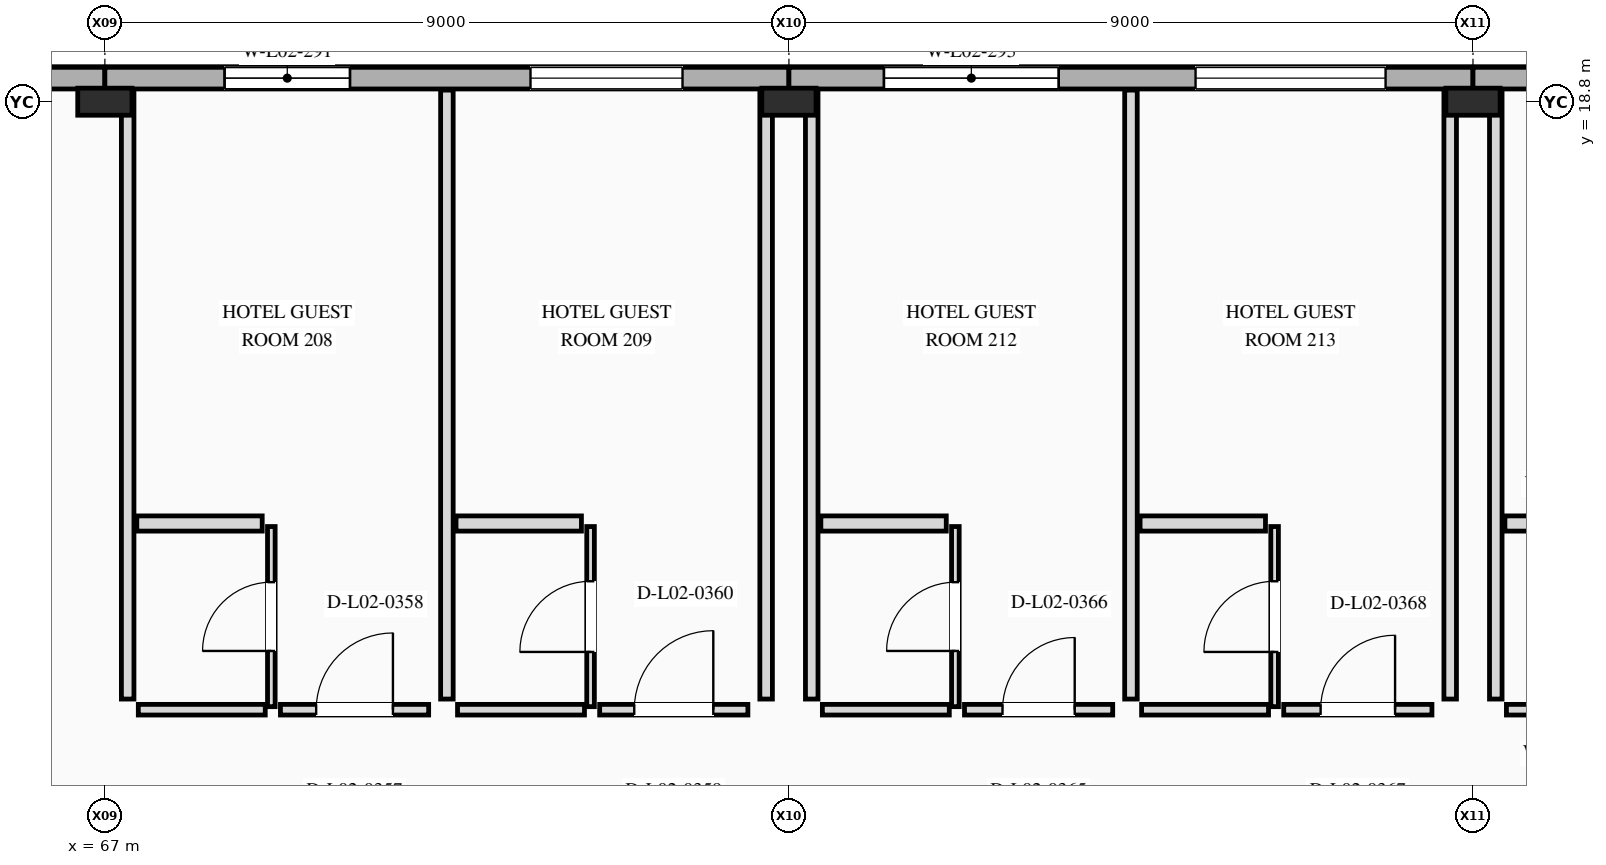
"""IFC4 building model, lengths in metres.
Left out: names, types, materials, properties, quantities, classifications, styles, units other than length and angle.
Written with IfcOpenShell. Run it as: python <this file> out.ifc"""

import sys

from ifc_helpers import new_model, si_unit, direction, frame, frame_2d, origin, origin_2d, place, context, subcontext, project, spatial, rectangle, i_section, extrude, element, fill, save


model = new_model("IFC4")
c1 = context("Model", 3, precision=1e-05, world=origin(), true_north=direction((0.0, 1.0)))
c2 = subcontext(c1, "Body", "Model", "MODEL_VIEW")
j1 = project(units=[si_unit("LENGTHUNIT", "METRE"), si_unit("PLANEANGLEUNIT", "RADIAN")], contexts=[c1])
p1 = place(None, origin())
s1 = spatial("IfcSite", under=j1, at=p1, CompositionType="ELEMENT")
p2 = place(p1, origin())
s2 = spatial("IfcBuilding", under=s1, at=p2, CompositionType="ELEMENT")
p3 = place(p2, frame((0.0, 0.0, 10.8)))
s3 = spatial("IfcBuildingStorey", under=s2, at=p3, CompositionType="ELEMENT", Elevation=10.8)
for number, where, z_axis, x_axis in (
    (1, (67.0, 18.8, 0.0), (0.0, 0.0, 1.0), (0.0, 1.0, 0.0)),
    (2, (76.0, 18.8, 0.0), (0.0, 0.0, 1.0), (0.0, 1.0, 0.0)),
    (3, (85.0, 18.8, 0.0), (0.0, 0.0, 1.0), (0.0, 1.0, 0.0)),
):
    element("IfcColumn", number, at=place(p3, frame(where, z_axis=z_axis, x_axis=x_axis)), inside=s3, PredefinedType="COLUMN", context=c2, shape_type="SweptSolid", body=[
        extrude(i_section(OverallWidth=0.356, OverallDepth=0.714, WebThickness=0.019, FlangeThickness=0.034, at=origin_2d()), origin(), (0.0, 0.0, 1.0), 4.8),
    ])
p4 = place(p3, frame((67.0, 19.11, 0.0), z_axis=(0.0, 0.0, 1.0), x_axis=(-1.0, 0.0, 0.0)))
e4 = element("IfcWall", 4, at=p4, inside=s3, PredefinedType="STANDARD", context=c2, shape_type="SweptSolid", body=[
    extrude(rectangle(XDim=8.545, YDim=0.285, at=frame_2d((4.273, 0.0))), origin(), (0.0, 0.0, 1.0), 4.8),
])
p5 = place(p3, frame((76.0, 19.11, 0.0), z_axis=(0.0, 0.0, 1.0), x_axis=(-1.0, 0.0, 0.0)))
e5 = element("IfcWall", 5, at=p5, inside=s3, PredefinedType="STANDARD", context=c2, shape_type="SweptSolid", body=[
    extrude(rectangle(XDim=9.0, YDim=0.285, at=frame_2d((4.5, 0.0))), origin(), (0.0, 0.0, 1.0), 4.8),
])
p6 = place(p5, frame((5.775, 0.0, 0.85)))
e6 = element("IfcOpeningElement", 6, at=p6, cuts=e5, PredefinedType="OPENING", context=c2, shape_type="SweptSolid", body=[
    extrude(rectangle(XDim=1.65, YDim=1.75, at=frame_2d((0.825, 0.875))), frame((0.0, 0.152, 0.0), z_axis=(0.0, -1.0, 0.0), x_axis=(1.0, 0.0, 0.0)), (0.0, 0.0, 1.0), 0.305),
])
p7 = place(p5, frame((1.4, 0.0, 0.85)))
e7 = element("IfcOpeningElement", 7, at=p7, cuts=e5, PredefinedType="OPENING", context=c2, shape_type="SweptSolid", body=[
    extrude(rectangle(XDim=2.0, YDim=1.65, at=frame_2d((1.0, 0.825))), frame((0.0, 0.152, 0.0), z_axis=(0.0, -1.0, 0.0), x_axis=(1.0, 0.0, 0.0)), (0.0, 0.0, 1.0), 0.305),
])
p8 = place(p3, frame((85.0, 19.11, 0.0), z_axis=(0.0, 0.0, 1.0), x_axis=(-1.0, 0.0, 0.0)))
e8 = element("IfcWall", 8, at=p8, inside=s3, PredefinedType="STANDARD", context=c2, shape_type="SweptSolid", body=[
    extrude(rectangle(XDim=9.0, YDim=0.285, at=frame_2d((4.5, 0.0))), origin(), (0.0, 0.0, 1.0), 4.8),
])
p9 = place(p8, frame((5.45, 0.0, 0.85)))
e9 = element("IfcOpeningElement", 9, at=p9, cuts=e8, PredefinedType="OPENING", context=c2, shape_type="SweptSolid", body=[
    extrude(rectangle(XDim=2.3, YDim=1.7, at=frame_2d((1.15, 0.85))), frame((0.0, 0.152, 0.0), z_axis=(0.0, -1.0, 0.0), x_axis=(1.0, 0.0, 0.0)), (0.0, 0.0, 1.0), 0.305),
])
p10 = place(p8, frame((1.15, 0.0, 0.85)))
e10 = element("IfcOpeningElement", 10, at=p10, cuts=e8, PredefinedType="OPENING", context=c2, shape_type="SweptSolid", body=[
    extrude(rectangle(XDim=2.5, YDim=1.75, at=frame_2d((1.25, 0.875))), frame((0.0, 0.152, 0.0), z_axis=(0.0, -1.0, 0.0), x_axis=(1.0, 0.0, 0.0)), (0.0, 0.0, 1.0), 0.305),
])
p11 = place(p3, frame((94.0, 19.11, 0.0), z_axis=(0.0, 0.0, 1.0), x_axis=(-1.0, 0.0, 0.0)))
e11 = element("IfcWall", 11, at=p11, inside=s3, PredefinedType="STANDARD", context=c2, shape_type="SweptSolid", body=[
    extrude(rectangle(XDim=9.0, YDim=0.285, at=frame_2d((4.5, 0.0))), origin(), (0.0, 0.0, 1.0), 4.8),
])
p12 = place(p3, frame((67.44, 10.8, 0.0), z_axis=(0.0, 0.0, 1.0), x_axis=(1.0, 0.0, 0.0)))
e12 = element("IfcWall", 12, at=p12, inside=s3, PredefinedType="PARTITIONING", context=c2, shape_type="SweptSolid", body=[
    extrude(rectangle(XDim=1.67, YDim=0.14, at=frame_2d((0.835, 0.0))), origin(), (0.0, 0.0, 1.0), 4.475),
])
p13 = place(p3, frame((69.31, 10.8, 0.0), z_axis=(0.0, 0.0, 1.0), x_axis=(1.0, 0.0, 0.0)))
e13 = element("IfcWall", 13, at=p13, inside=s3, PredefinedType="PARTITIONING", context=c2, shape_type="SweptSolid", body=[
    extrude(rectangle(XDim=1.95, YDim=0.14, at=frame_2d((0.975, 0.0))), origin(), (0.0, 0.0, 1.0), 4.475),
])
p14 = place(p13, frame((0.47, 0.0, 0.0)))
e14 = element("IfcOpeningElement", 14, at=p14, cuts=e13, PredefinedType="OPENING", context=c2, shape_type="SweptSolid", body=[
    extrude(rectangle(XDim=1.01, YDim=2.35, at=frame_2d((0.505, 1.175))), frame((0.0, 0.08, 0.0), z_axis=(0.0, -1.0, 0.0), x_axis=(1.0, 0.0, 0.0)), (0.0, 0.0, 1.0), 0.16),
])
p15 = place(p3, frame((67.3, 10.94, 0.0), z_axis=(0.0, 0.0, 1.0), x_axis=(0.0, 1.0, 0.0)))
e15 = element("IfcWall", 15, at=p15, inside=s3, PredefinedType="PARTITIONING", context=c2, shape_type="SweptSolid", body=[
    extrude(rectangle(XDim=8.012, YDim=0.165, at=frame_2d((4.006, 0.0))), origin(), (0.0, 0.0, 1.0), 3.804),
])
p16 = place(p3, frame((71.5, 10.94, 0.0), z_axis=(0.0, 0.0, 1.0), x_axis=(0.0, 1.0, 0.0)))
e16 = element("IfcWall", 16, at=p16, inside=s3, PredefinedType="PARTITIONING", context=c2, shape_type="SweptSolid", body=[
    extrude(rectangle(XDim=8.012, YDim=0.165, at=frame_2d((4.006, 0.0))), origin(), (0.0, 0.0, 1.0), 3.888),
])
p17 = place(p3, frame((69.19, 10.84, 0.0), z_axis=(0.0, 0.0, 1.0), x_axis=(0.0, 1.0, 0.0)))
e17 = element("IfcWall", 17, at=p17, inside=s3, PredefinedType="PARTITIONING", context=c2, shape_type="SweptSolid", body=[
    extrude(rectangle(XDim=2.37, YDim=0.1, at=frame_2d((1.185, 0.0))), origin(), (0.0, 0.0, 1.0), 4.083),
])
p18 = place(p17, frame((0.733, 0.0, 0.0)))
e18 = element("IfcOpeningElement", 18, at=p18, cuts=e17, PredefinedType="OPENING", context=c2, shape_type="SweptSolid", body=[
    extrude(rectangle(XDim=0.905, YDim=2.1, at=frame_2d((0.453, 1.05))), frame((0.0, 0.06, 0.0), z_axis=(0.0, -1.0, 0.0), x_axis=(1.0, 0.0, 0.0)), (0.0, 0.0, 1.0), 0.12),
])
p19 = place(p3, frame((67.42, 13.25, 0.0), z_axis=(0.0, 0.0, 1.0), x_axis=(1.0, 0.0, 0.0)))
e19 = element("IfcWall", 19, at=p19, inside=s3, PredefinedType="PLUMBINGWALL", context=c2, shape_type="SweptSolid", body=[
    extrude(rectangle(XDim=1.65, YDim=0.2, at=frame_2d((0.825, 0.0))), origin(), (0.0, 0.0, 1.0), 4.475),
])
p20 = place(p3, frame((71.64, 10.8, 0.0), z_axis=(0.0, 0.0, 1.0), x_axis=(1.0, 0.0, 0.0)))
e20 = element("IfcWall", 20, at=p20, inside=s3, PredefinedType="PARTITIONING", context=c2, shape_type="SweptSolid", body=[
    extrude(rectangle(XDim=1.67, YDim=0.14, at=frame_2d((0.835, 0.0))), origin(), (0.0, 0.0, 1.0), 4.475),
])
p21 = place(p3, frame((73.51, 10.8, 0.0), z_axis=(0.0, 0.0, 1.0), x_axis=(1.0, 0.0, 0.0)))
e21 = element("IfcWall", 21, at=p21, inside=s3, PredefinedType="PARTITIONING", context=c2, shape_type="SweptSolid", body=[
    extrude(rectangle(XDim=1.95, YDim=0.14, at=frame_2d((0.975, 0.0))), origin(), (0.0, 0.0, 1.0), 4.475),
])
p22 = place(p21, frame((0.455, 0.0, 0.0)))
e22 = element("IfcOpeningElement", 22, at=p22, cuts=e21, PredefinedType="OPENING", context=c2, shape_type="SweptSolid", body=[
    extrude(rectangle(XDim=1.04, YDim=2.4, at=frame_2d((0.52, 1.2))), frame((0.0, 0.08, 0.0), z_axis=(0.0, -1.0, 0.0), x_axis=(1.0, 0.0, 0.0)), (0.0, 0.0, 1.0), 0.16),
])
p23 = place(p3, frame((75.7, 10.94, 0.0), z_axis=(0.0, 0.0, 1.0), x_axis=(0.0, 1.0, 0.0)))
e23 = element("IfcWall", 23, at=p23, inside=s3, PredefinedType="PARTITIONING", context=c2, shape_type="SweptSolid", body=[
    extrude(rectangle(XDim=8.012, YDim=0.165, at=frame_2d((4.006, 0.0))), origin(), (0.0, 0.0, 1.0), 3.804),
])
p24 = place(p3, frame((73.39, 10.84, 0.0), z_axis=(0.0, 0.0, 1.0), x_axis=(0.0, 1.0, 0.0)))
e24 = element("IfcWall", 24, at=p24, inside=s3, PredefinedType="PARTITIONING", context=c2, shape_type="SweptSolid", body=[
    extrude(rectangle(XDim=2.37, YDim=0.1, at=frame_2d((1.185, 0.0))), origin(), (0.0, 0.0, 1.0), 4.083),
])
p25 = place(p24, frame((0.72, 0.0, 0.0)))
e25 = element("IfcOpeningElement", 25, at=p25, cuts=e24, PredefinedType="OPENING", context=c2, shape_type="SweptSolid", body=[
    extrude(rectangle(XDim=0.93, YDim=2.14, at=frame_2d((0.465, 1.07))), frame((0.0, 0.06, 0.0), z_axis=(0.0, -1.0, 0.0), x_axis=(1.0, 0.0, 0.0)), (0.0, 0.0, 1.0), 0.12),
])
p26 = place(p3, frame((71.62, 13.25, 0.0), z_axis=(0.0, 0.0, 1.0), x_axis=(1.0, 0.0, 0.0)))
e26 = element("IfcWall", 26, at=p26, inside=s3, PredefinedType="PLUMBINGWALL", context=c2, shape_type="SweptSolid", body=[
    extrude(rectangle(XDim=1.65, YDim=0.2, at=frame_2d((0.825, 0.0))), origin(), (0.0, 0.0, 1.0), 4.475),
])
p27 = place(p3, frame((76.44, 10.8, 0.0), z_axis=(0.0, 0.0, 1.0), x_axis=(1.0, 0.0, 0.0)))
e27 = element("IfcWall", 27, at=p27, inside=s3, PredefinedType="PARTITIONING", context=c2, shape_type="SweptSolid", body=[
    extrude(rectangle(XDim=1.67, YDim=0.14, at=frame_2d((0.835, 0.0))), origin(), (0.0, 0.0, 1.0), 4.475),
])
p28 = place(p3, frame((78.31, 10.8, 0.0), z_axis=(0.0, 0.0, 1.0), x_axis=(1.0, 0.0, 0.0)))
e28 = element("IfcWall", 28, at=p28, inside=s3, PredefinedType="PARTITIONING", context=c2, shape_type="SweptSolid", body=[
    extrude(rectangle(XDim=1.95, YDim=0.14, at=frame_2d((0.975, 0.0))), origin(), (0.0, 0.0, 1.0), 4.475),
])
p29 = place(p28, frame((0.5, 0.0, 0.0)))
e29 = element("IfcOpeningElement", 29, at=p29, cuts=e28, PredefinedType="OPENING", context=c2, shape_type="SweptSolid", body=[
    extrude(rectangle(XDim=0.95, YDim=2.15, at=frame_2d((0.475, 1.075))), frame((0.0, 0.08, 0.0), z_axis=(0.0, -1.0, 0.0), x_axis=(1.0, 0.0, 0.0)), (0.0, 0.0, 1.0), 0.16),
])
p30 = place(p3, frame((76.3, 10.94, 0.0), z_axis=(0.0, 0.0, 1.0), x_axis=(0.0, 1.0, 0.0)))
e30 = element("IfcWall", 30, at=p30, inside=s3, PredefinedType="PARTITIONING", context=c2, shape_type="SweptSolid", body=[
    extrude(rectangle(XDim=8.012, YDim=0.165, at=frame_2d((4.006, 0.0))), origin(), (0.0, 0.0, 1.0), 3.804),
])
p31 = place(p3, frame((80.5, 10.94, 0.0), z_axis=(0.0, 0.0, 1.0), x_axis=(0.0, 1.0, 0.0)))
e31 = element("IfcWall", 31, at=p31, inside=s3, PredefinedType="PARTITIONING", context=c2, shape_type="SweptSolid", body=[
    extrude(rectangle(XDim=8.012, YDim=0.165, at=frame_2d((4.006, 0.0))), origin(), (0.0, 0.0, 1.0), 3.888),
])
p32 = place(p3, frame((78.19, 10.84, 0.0), z_axis=(0.0, 0.0, 1.0), x_axis=(0.0, 1.0, 0.0)))
e32 = element("IfcWall", 32, at=p32, inside=s3, PredefinedType="PARTITIONING", context=c2, shape_type="SweptSolid", body=[
    extrude(rectangle(XDim=2.37, YDim=0.1, at=frame_2d((1.185, 0.0))), origin(), (0.0, 0.0, 1.0), 4.083),
])
p33 = place(p32, frame((0.733, 0.0, 0.0)))
e33 = element("IfcOpeningElement", 33, at=p33, cuts=e32, PredefinedType="OPENING", context=c2, shape_type="SweptSolid", body=[
    extrude(rectangle(XDim=0.905, YDim=2.18, at=frame_2d((0.453, 1.09))), frame((0.0, 0.06, 0.0), z_axis=(0.0, -1.0, 0.0), x_axis=(1.0, 0.0, 0.0)), (0.0, 0.0, 1.0), 0.12),
])
p34 = place(p3, frame((76.42, 13.25, 0.0), z_axis=(0.0, 0.0, 1.0), x_axis=(1.0, 0.0, 0.0)))
e34 = element("IfcWall", 34, at=p34, inside=s3, PredefinedType="PLUMBINGWALL", context=c2, shape_type="SweptSolid", body=[
    extrude(rectangle(XDim=1.65, YDim=0.2, at=frame_2d((0.825, 0.0))), origin(), (0.0, 0.0, 1.0), 4.475),
])
p35 = place(p3, frame((80.64, 10.8, 0.0), z_axis=(0.0, 0.0, 1.0), x_axis=(1.0, 0.0, 0.0)))
e35 = element("IfcWall", 35, at=p35, inside=s3, PredefinedType="PARTITIONING", context=c2, shape_type="SweptSolid", body=[
    extrude(rectangle(XDim=1.67, YDim=0.14, at=frame_2d((0.835, 0.0))), origin(), (0.0, 0.0, 1.0), 4.475),
])
p36 = place(p3, frame((82.51, 10.8, 0.0), z_axis=(0.0, 0.0, 1.0), x_axis=(1.0, 0.0, 0.0)))
e36 = element("IfcWall", 36, at=p36, inside=s3, PredefinedType="PARTITIONING", context=c2, shape_type="SweptSolid", body=[
    extrude(rectangle(XDim=1.95, YDim=0.14, at=frame_2d((0.975, 0.0))), origin(), (0.0, 0.0, 1.0), 4.475),
])
p37 = place(p36, frame((0.485, 0.0, 0.0)))
e37 = element("IfcOpeningElement", 37, at=p37, cuts=e36, PredefinedType="OPENING", context=c2, shape_type="SweptSolid", body=[
    extrude(rectangle(XDim=0.98, YDim=2.2, at=frame_2d((0.49, 1.1))), frame((0.0, 0.08, 0.0), z_axis=(0.0, -1.0, 0.0), x_axis=(1.0, 0.0, 0.0)), (0.0, 0.0, 1.0), 0.16),
])
p38 = place(p3, frame((84.7, 10.94, 0.0), z_axis=(0.0, 0.0, 1.0), x_axis=(0.0, 1.0, 0.0)))
e38 = element("IfcWall", 38, at=p38, inside=s3, PredefinedType="PARTITIONING", context=c2, shape_type="SweptSolid", body=[
    extrude(rectangle(XDim=8.012, YDim=0.165, at=frame_2d((4.006, 0.0))), origin(), (0.0, 0.0, 1.0), 3.804),
])
p39 = place(p3, frame((82.39, 10.84, 0.0), z_axis=(0.0, 0.0, 1.0), x_axis=(0.0, 1.0, 0.0)))
e39 = element("IfcWall", 39, at=p39, inside=s3, PredefinedType="PARTITIONING", context=c2, shape_type="SweptSolid", body=[
    extrude(rectangle(XDim=2.37, YDim=0.1, at=frame_2d((1.185, 0.0))), origin(), (0.0, 0.0, 1.0), 4.083),
])
p40 = place(p39, frame((0.72, 0.0, 0.0)))
e40 = element("IfcOpeningElement", 40, at=p40, cuts=e39, PredefinedType="OPENING", context=c2, shape_type="SweptSolid", body=[
    extrude(rectangle(XDim=0.93, YDim=2.22, at=frame_2d((0.465, 1.11))), frame((0.0, 0.06, 0.0), z_axis=(0.0, -1.0, 0.0), x_axis=(1.0, 0.0, 0.0)), (0.0, 0.0, 1.0), 0.12),
])
p41 = place(p3, frame((80.62, 13.25, 0.0), z_axis=(0.0, 0.0, 1.0), x_axis=(1.0, 0.0, 0.0)))
e41 = element("IfcWall", 41, at=p41, inside=s3, PredefinedType="PLUMBINGWALL", context=c2, shape_type="SweptSolid", body=[
    extrude(rectangle(XDim=1.65, YDim=0.2, at=frame_2d((0.825, 0.0))), origin(), (0.0, 0.0, 1.0), 4.475),
])
p42 = place(p3, frame((85.44, 10.8, 0.0), z_axis=(0.0, 0.0, 1.0), x_axis=(1.0, 0.0, 0.0)))
e42 = element("IfcWall", 42, at=p42, inside=s3, PredefinedType="PARTITIONING", context=c2, shape_type="SweptSolid", body=[
    extrude(rectangle(XDim=1.93, YDim=0.14, at=frame_2d((0.965, 0.0))), origin(), (0.0, 0.0, 1.0), 4.475),
])
p43 = place(p3, frame((85.3, 10.94, 0.0), z_axis=(0.0, 0.0, 1.0), x_axis=(0.0, 1.0, 0.0)))
e43 = element("IfcWall", 43, at=p43, inside=s3, PredefinedType="PARTITIONING", context=c2, shape_type="SweptSolid", body=[
    extrude(rectangle(XDim=8.012, YDim=0.165, at=frame_2d((4.006, 0.0))), origin(), (0.0, 0.0, 1.0), 3.804),
])
p44 = place(p3, frame((85.42, 13.25, 0.0), z_axis=(0.0, 0.0, 1.0), x_axis=(1.0, 0.0, 0.0)))
e44 = element("IfcWall", 44, at=p44, inside=s3, PredefinedType="PLUMBINGWALL", context=c2, shape_type="SweptSolid", body=[
    extrude(rectangle(XDim=1.91, YDim=0.2, at=frame_2d((0.955, 0.0))), origin(), (0.0, 0.0, 1.0), 4.475),
])
p45 = place(p6, origin())
e45 = element("IfcWindow", 45, at=p45, inside=s3, PartitioningType="SINGLE_PANEL", PredefinedType="WINDOW", context=c2, shape_type="SweptSolid", body=[
    extrude(rectangle(XDim=1.65, YDim=1.75, at=frame_2d((0.825, 0.875))), frame((0.0, 0.03, 0.0), z_axis=(0.0, -1.0, 0.0), x_axis=(1.0, 0.0, 0.0)), (0.0, 0.0, 1.0), 0.06),
])
fill(e6, e45)
p46 = place(p7, origin())
e46 = element("IfcWindow", 46, at=p46, inside=s3, PartitioningType="SINGLE_PANEL", PredefinedType="WINDOW", context=c2, shape_type="SweptSolid", body=[
    extrude(rectangle(XDim=2.0, YDim=1.65, at=frame_2d((1.0, 0.825))), frame((0.0, 0.03, 0.0), z_axis=(0.0, -1.0, 0.0), x_axis=(1.0, 0.0, 0.0)), (0.0, 0.0, 1.0), 0.06),
])
fill(e7, e46)
p47 = place(p9, origin())
e47 = element("IfcWindow", 47, at=p47, inside=s3, PartitioningType="SINGLE_PANEL", PredefinedType="WINDOW", context=c2, shape_type="SweptSolid", body=[
    extrude(rectangle(XDim=2.3, YDim=1.7, at=frame_2d((1.15, 0.85))), frame((0.0, 0.03, 0.0), z_axis=(0.0, -1.0, 0.0), x_axis=(1.0, 0.0, 0.0)), (0.0, 0.0, 1.0), 0.06),
])
fill(e9, e47)
p48 = place(p10, origin())
e48 = element("IfcWindow", 48, at=p48, inside=s3, PartitioningType="SINGLE_PANEL", PredefinedType="WINDOW", context=c2, shape_type="SweptSolid", body=[
    extrude(rectangle(XDim=2.5, YDim=1.75, at=frame_2d((1.25, 0.875))), frame((0.0, 0.03, 0.0), z_axis=(0.0, -1.0, 0.0), x_axis=(1.0, 0.0, 0.0)), (0.0, 0.0, 1.0), 0.06),
])
fill(e10, e48)
p49 = place(p14, origin())
e49 = element("IfcDoor", 49, at=p49, inside=s3, OperationType="SINGLE_SWING_RIGHT", PredefinedType="DOOR", context=c2, shape_type="SweptSolid", body=[
    extrude(rectangle(XDim=1.01, YDim=2.35, at=frame_2d((0.505, 1.175))), frame((0.0, 0.025, 0.0), z_axis=(0.0, -1.0, 0.0), x_axis=(1.0, 0.0, 0.0)), (0.0, 0.0, 1.0), 0.05),
])
fill(e14, e49)
p50 = place(p18, origin())
e50 = element("IfcDoor", 50, at=p50, inside=s3, OperationType="SINGLE_SWING_LEFT", PredefinedType="DOOR", context=c2, shape_type="SweptSolid", body=[
    extrude(rectangle(XDim=0.905, YDim=2.1, at=frame_2d((0.453, 1.05))), frame((0.0, 0.025, 0.0), z_axis=(0.0, -1.0, 0.0), x_axis=(1.0, 0.0, 0.0)), (0.0, 0.0, 1.0), 0.05),
])
fill(e18, e50)
p51 = place(p22, origin())
e51 = element("IfcDoor", 51, at=p51, inside=s3, OperationType="SINGLE_SWING_RIGHT", PredefinedType="DOOR", context=c2, shape_type="SweptSolid", body=[
    extrude(rectangle(XDim=1.04, YDim=2.4, at=frame_2d((0.52, 1.2))), frame((0.0, 0.025, 0.0), z_axis=(0.0, -1.0, 0.0), x_axis=(1.0, 0.0, 0.0)), (0.0, 0.0, 1.0), 0.05),
])
fill(e22, e51)
p52 = place(p25, origin())
e52 = element("IfcDoor", 52, at=p52, inside=s3, OperationType="SINGLE_SWING_LEFT", PredefinedType="DOOR", context=c2, shape_type="SweptSolid", body=[
    extrude(rectangle(XDim=0.93, YDim=2.14, at=frame_2d((0.465, 1.07))), frame((0.0, 0.025, 0.0), z_axis=(0.0, -1.0, 0.0), x_axis=(1.0, 0.0, 0.0)), (0.0, 0.0, 1.0), 0.05),
])
fill(e25, e52)
p53 = place(p29, origin())
e53 = element("IfcDoor", 53, at=p53, inside=s3, OperationType="SINGLE_SWING_RIGHT", PredefinedType="DOOR", context=c2, shape_type="SweptSolid", body=[
    extrude(rectangle(XDim=0.95, YDim=2.15, at=frame_2d((0.475, 1.075))), frame((0.0, 0.025, 0.0), z_axis=(0.0, -1.0, 0.0), x_axis=(1.0, 0.0, 0.0)), (0.0, 0.0, 1.0), 0.05),
])
fill(e29, e53)
p54 = place(p33, origin())
e54 = element("IfcDoor", 54, at=p54, inside=s3, OperationType="SINGLE_SWING_LEFT", PredefinedType="DOOR", context=c2, shape_type="SweptSolid", body=[
    extrude(rectangle(XDim=0.905, YDim=2.18, at=frame_2d((0.453, 1.09))), frame((0.0, 0.025, 0.0), z_axis=(0.0, -1.0, 0.0), x_axis=(1.0, 0.0, 0.0)), (0.0, 0.0, 1.0), 0.05),
])
fill(e33, e54)
p55 = place(p37, origin())
e55 = element("IfcDoor", 55, at=p55, inside=s3, OperationType="SINGLE_SWING_RIGHT", PredefinedType="DOOR", context=c2, shape_type="SweptSolid", body=[
    extrude(rectangle(XDim=0.98, YDim=2.2, at=frame_2d((0.49, 1.1))), frame((0.0, 0.025, 0.0), z_axis=(0.0, -1.0, 0.0), x_axis=(1.0, 0.0, 0.0)), (0.0, 0.0, 1.0), 0.05),
])
fill(e37, e55)
p56 = place(p40, origin())
e56 = element("IfcDoor", 56, at=p56, inside=s3, OperationType="SINGLE_SWING_LEFT", PredefinedType="DOOR", context=c2, shape_type="SweptSolid", body=[
    extrude(rectangle(XDim=0.93, YDim=2.22, at=frame_2d((0.465, 1.11))), frame((0.0, 0.025, 0.0), z_axis=(0.0, -1.0, 0.0), x_axis=(1.0, 0.0, 0.0)), (0.0, 0.0, 1.0), 0.05),
])
fill(e40, e56)
save(model, sys.argv[1])
